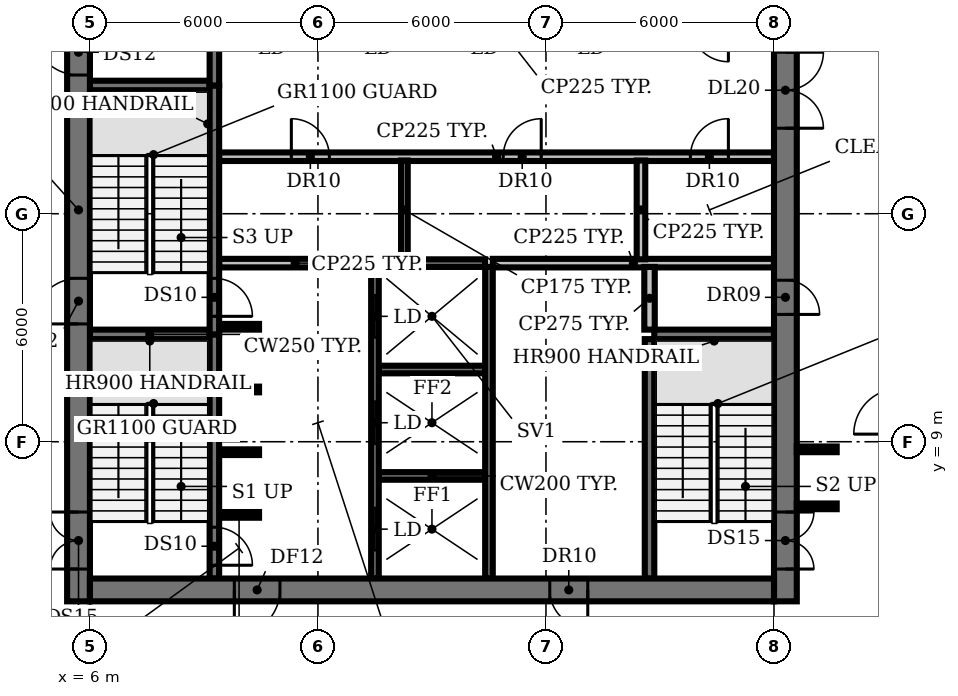
"""IFC4 building model, lengths in metres.
Left out: names, types, materials, properties, quantities, classifications, styles, units other than length and angle.
Written with IfcOpenShell. Run it as: python <this file> out.ifc"""

import sys

from ifc_helpers import new_model, si_unit, direction, frame, frame_2d, origin, place, context, subcontext, project, spatial, rectangle, extrude, element, fill, save


model = new_model("IFC4")
c1 = context("Model", 3, precision=1e-05, world=origin(), true_north=direction((0.0, 1.0)))
c2 = subcontext(c1, "Body", "Model", "MODEL_VIEW")
j1 = project(units=[si_unit("LENGTHUNIT", "METRE"), si_unit("PLANEANGLEUNIT", "RADIAN")], contexts=[c1])
p1 = place(None, origin())
s1 = spatial("IfcSite", under=j1, at=p1, CompositionType="ELEMENT")
p2 = place(p1, origin())
s2 = spatial("IfcBuilding", under=s1, at=p2, CompositionType="ELEMENT")
p3 = place(p2, frame((0.0, 0.0, 150.8)))
s3 = spatial("IfcBuildingStorey", under=s2, at=p3, CompositionType="ELEMENT", Elevation=150.8)
p4 = place(p3, frame((9.4, 7.075, 0.0), z_axis=(0.0, 0.0, 1.0), x_axis=(1.0, 0.0, 0.0)))
e1 = element("IfcWall", 1, at=p4, inside=s3, PredefinedType="SHEAR", context=c2, shape_type="SweptSolid", body=[
    extrude(rectangle(XDim=1.05, YDim=0.15, at=frame_2d((0.525, 0.0))), origin(), (0.0, 0.0, 1.0), 3.85),
])
p5 = place(p3, frame((13.6, 8.1, 0.0), z_axis=(0.0, 0.0, 1.0), x_axis=(1.0, 0.0, 0.0)))
e2 = element("IfcWall", 2, at=p5, inside=s3, PredefinedType="SHEAR", context=c2, shape_type="SweptSolid", body=[
    extrude(rectangle(XDim=2.8, YDim=0.2, at=frame_2d((1.4, 0.0))), origin(), (0.0, 0.0, 1.0), 3.85),
])
for number, where, z_axis, x_axis in (
    (3, (9.4, 8.725, 0.0), (0.0, 0.0, 1.0), (1.0, 0.0, 0.0)),
    (4, (9.4, 10.375, 0.0), (0.0, 0.0, 1.0), (1.0, 0.0, 0.0)),
):
    element("IfcWall", number, at=place(p3, frame(where, z_axis=z_axis, x_axis=x_axis)), inside=s3, PredefinedType="SHEAR", context=c2, shape_type="SweptSolid", body=[
        extrude(rectangle(XDim=1.05, YDim=0.15, at=frame_2d((0.525, 0.0))), origin(), (0.0, 0.0, 1.0), 3.85),
    ])
p6 = place(p3, frame((13.6, 10.9, 0.0), z_axis=(0.0, 0.0, 1.0), x_axis=(1.0, 0.0, 0.0)))
e5 = element("IfcWall", 5, at=p6, inside=s3, PredefinedType="SHEAR", context=c2, shape_type="SweptSolid", body=[
    extrude(rectangle(XDim=2.8, YDim=0.2, at=frame_2d((1.4, 0.0))), origin(), (0.0, 0.0, 1.0), 3.85),
])
for number, where, z_axis, x_axis in (
    (6, (6.0, 11.825, 0.0), (0.0, 0.0, 1.0), (1.0, 0.0, 0.0)),
    (7, (20.85, 11.825, 0.0), (0.0, 0.0, 1.0), (1.0, 0.0, 0.0)),
):
    element("IfcWall", number, at=place(p3, frame(where, z_axis=z_axis, x_axis=x_axis)), inside=s3, PredefinedType="SHEAR", context=c2, shape_type="SweptSolid", body=[
        extrude(rectangle(XDim=3.15, YDim=0.25, at=frame_2d((1.575, 0.0))), origin(), (0.0, 0.0, 1.0), 3.85),
    ])
p7 = place(p3, frame((9.4, 12.025, 0.0), z_axis=(0.0, 0.0, 1.0), x_axis=(1.0, 0.0, 0.0)))
e8 = element("IfcWall", 8, at=p7, inside=s3, PredefinedType="SHEAR", context=c2, shape_type="SweptSolid", body=[
    extrude(rectangle(XDim=1.05, YDim=0.15, at=frame_2d((0.525, 0.0))), origin(), (0.0, 0.0, 1.0), 3.85),
])
p8 = place(p3, frame((9.4, 13.7, 0.0), z_axis=(0.0, 0.0, 1.0), x_axis=(1.0, 0.0, 0.0)))
e9 = element("IfcWall", 9, at=p8, inside=s3, PredefinedType="PARTITIONING", context=c2, shape_type="SweptSolid", body=[
    extrude(rectangle(XDim=4.0, YDim=0.225, at=frame_2d((2.0, 0.0))), origin(), (0.0, 0.0, 1.0), 3.85),
])
p9 = place(p3, frame((13.6, 13.7, 0.0), z_axis=(0.0, 0.0, 1.0), x_axis=(1.0, 0.0, 0.0)))
e10 = element("IfcWall", 10, at=p9, inside=s3, PredefinedType="SHEAR", context=c2, shape_type="SweptSolid", body=[
    extrude(rectangle(XDim=2.8, YDim=0.2, at=frame_2d((1.4, 0.0))), origin(), (0.0, 0.0, 1.0), 3.85),
])
p10 = place(p3, frame((16.6, 13.7, 0.0), z_axis=(0.0, 0.0, 1.0), x_axis=(1.0, 0.0, 0.0)))
e11 = element("IfcWall", 11, at=p10, inside=s3, PredefinedType="PARTITIONING", context=c2, shape_type="SweptSolid", body=[
    extrude(rectangle(XDim=7.4, YDim=0.225, at=frame_2d((3.7, 0.0))), origin(), (0.0, 0.0, 1.0), 3.85),
])
p11 = place(p3, frame((9.4, 16.5, 0.0), z_axis=(0.0, 0.0, 1.0), x_axis=(1.0, 0.0, 0.0)))
e12 = element("IfcWall", 12, at=p11, inside=s3, PredefinedType="PARTITIONING", context=c2, shape_type="SweptSolid", body=[
    extrude(rectangle(XDim=14.6, YDim=0.225, at=frame_2d((7.3, 0.0))), origin(), (0.0, 0.0, 1.0), 3.85),
])
p12 = place(p11, frame((1.9, 0.0, 0.0)))
e13 = element("IfcOpeningElement", 13, at=p12, cuts=e12, PredefinedType="OPENING", context=c2, shape_type="SweptSolid", body=[
    extrude(rectangle(XDim=1.0, YDim=2.1, at=frame_2d((0.5, 1.05))), frame((0.0, 0.123, 0.0), z_axis=(0.0, -1.0, 0.0), x_axis=(1.0, 0.0, 0.0)), (0.0, 0.0, 1.0), 0.245),
])
p13 = place(p11, frame((7.475, 0.0, 0.0)))
e14 = element("IfcOpeningElement", 14, at=p13, cuts=e12, PredefinedType="OPENING", context=c2, shape_type="SweptSolid", body=[
    extrude(rectangle(XDim=1.0, YDim=2.1, at=frame_2d((0.5, 1.05))), frame((0.0, 0.123, 0.0), z_axis=(0.0, -1.0, 0.0), x_axis=(1.0, 0.0, 0.0)), (0.0, 0.0, 1.0), 0.245),
])
p14 = place(p11, frame((12.4, 0.0, 0.0)))
e15 = element("IfcOpeningElement", 15, at=p14, cuts=e12, PredefinedType="OPENING", context=c2, shape_type="SweptSolid", body=[
    extrude(rectangle(XDim=1.0, YDim=2.1, at=frame_2d((0.5, 1.05))), frame((0.0, 0.123, 0.0), z_axis=(0.0, -1.0, 0.0), x_axis=(1.0, 0.0, 0.0)), (0.0, 0.0, 1.0), 0.245),
])
p15 = place(p3, frame((6.0, 18.375, 0.0), z_axis=(0.0, 0.0, 1.0), x_axis=(1.0, 0.0, 0.0)))
e16 = element("IfcWall", 16, at=p15, inside=s3, PredefinedType="SHEAR", context=c2, shape_type="SweptSolid", body=[
    extrude(rectangle(XDim=3.15, YDim=0.25, at=frame_2d((1.575, 0.0))), origin(), (0.0, 0.0, 1.0), 3.85),
])
p16 = place(p3, frame((9.275, 11.825, 0.0), z_axis=(0.0, 0.0, 1.0), x_axis=(0.0, -1.0, 0.0)))
e17 = element("IfcWall", 17, at=p16, inside=s3, PredefinedType="SHEAR", context=c2, shape_type="SweptSolid", body=[
    extrude(rectangle(XDim=6.425, YDim=0.25, at=frame_2d((3.212, 0.0))), origin(), (0.0, 0.0, 1.0), 3.85),
])
p17 = place(p16, frame((5.075, 0.0, 0.0)))
e18 = element("IfcOpeningElement", 18, at=p17, cuts=e17, PredefinedType="OPENING", context=c2, shape_type="SweptSolid", body=[
    extrude(rectangle(XDim=1.0, YDim=2.1, at=frame_2d((0.5, 1.05))), frame((0.0, 0.135, 0.0), z_axis=(0.0, -1.0, 0.0), x_axis=(1.0, 0.0, 0.0)), (0.0, 0.0, 1.0), 0.27),
])
p18 = place(p3, frame((9.275, 18.375, 0.0), z_axis=(0.0, 0.0, 1.0), x_axis=(0.0, -1.0, 0.0)))
e19 = element("IfcWall", 19, at=p18, inside=s3, PredefinedType="SHEAR", context=c2, shape_type="SweptSolid", body=[
    extrude(rectangle(XDim=6.55, YDim=0.25, at=frame_2d((3.275, 0.0))), origin(), (0.0, 0.0, 1.0), 3.85),
])
p19 = place(p18, frame((5.075, 0.0, 0.0)))
e20 = element("IfcOpeningElement", 20, at=p19, cuts=e19, PredefinedType="OPENING", context=c2, shape_type="SweptSolid", body=[
    extrude(rectangle(XDim=1.0, YDim=2.1, at=frame_2d((0.5, 1.05))), frame((0.0, 0.135, 0.0), z_axis=(0.0, -1.0, 0.0), x_axis=(1.0, 0.0, 0.0)), (0.0, 0.0, 1.0), 0.27),
])
p20 = place(p3, frame((9.275, 18.375, 0.0), z_axis=(0.0, 0.0, 1.0), x_axis=(0.0, 1.0, 0.0)))
e21 = element("IfcWall", 21, at=p20, inside=s3, PredefinedType="SHEAR", context=c2, shape_type="SweptSolid", body=[
    extrude(rectangle(XDim=6.425, YDim=0.25, at=frame_2d((3.212, 0.0))), origin(), (0.0, 0.0, 1.0), 3.85),
])
p21 = place(p3, frame((13.5, 5.4, 0.0), z_axis=(0.0, 0.0, 1.0), x_axis=(0.0, 1.0, 0.0)))
e22 = element("IfcWall", 22, at=p21, inside=s3, PredefinedType="SHEAR", context=c2, shape_type="SweptSolid", body=[
    extrude(rectangle(XDim=8.2, YDim=0.2, at=frame_2d((4.1, 0.0))), origin(), (0.0, 0.0, 1.0), 3.85),
])
p22 = place(p21, frame((0.75, 0.0, 0.0)))
e23 = element("IfcOpeningElement", 23, at=p22, cuts=e22, PredefinedType="OPENING", context=c2, shape_type="SweptSolid", body=[
    extrude(rectangle(XDim=1.1, YDim=2.1, at=frame_2d((0.55, 1.05))), frame((0.0, 0.11, 0.0), z_axis=(0.0, -1.0, 0.0), x_axis=(1.0, 0.0, 0.0)), (0.0, 0.0, 1.0), 0.22),
])
p23 = place(p21, frame((3.55, 0.0, 0.0)))
e24 = element("IfcOpeningElement", 24, at=p23, cuts=e22, PredefinedType="OPENING", context=c2, shape_type="SweptSolid", body=[
    extrude(rectangle(XDim=1.1, YDim=2.1, at=frame_2d((0.55, 1.05))), frame((0.0, 0.11, 0.0), z_axis=(0.0, -1.0, 0.0), x_axis=(1.0, 0.0, 0.0)), (0.0, 0.0, 1.0), 0.22),
])
p24 = place(p21, frame((6.35, 0.0, 0.0)))
e25 = element("IfcOpeningElement", 25, at=p24, cuts=e22, PredefinedType="OPENING", context=c2, shape_type="SweptSolid", body=[
    extrude(rectangle(XDim=1.1, YDim=2.1, at=frame_2d((0.55, 1.05))), frame((0.0, 0.11, 0.0), z_axis=(0.0, -1.0, 0.0), x_axis=(1.0, 0.0, 0.0)), (0.0, 0.0, 1.0), 0.22),
])
p25 = place(p3, frame((14.275, 13.8, 0.0), z_axis=(0.0, 0.0, 1.0), x_axis=(0.0, 1.0, 0.0)))
e26 = element("IfcWall", 26, at=p25, inside=s3, PredefinedType="PARTITIONING", context=c2, shape_type="SweptSolid", body=[
    extrude(rectangle(XDim=2.6, YDim=0.175, at=frame_2d((1.3, 0.0))), origin(), (0.0, 0.0, 1.0), 3.85),
])
p26 = place(p3, frame((16.5, 5.4, 0.0), z_axis=(0.0, 0.0, 1.0), x_axis=(0.0, 1.0, 0.0)))
e27 = element("IfcWall", 27, at=p26, inside=s3, PredefinedType="SHEAR", context=c2, shape_type="SweptSolid", body=[
    extrude(rectangle(XDim=8.2, YDim=0.2, at=frame_2d((4.1, 0.0))), origin(), (0.0, 0.0, 1.0), 3.85),
])
p27 = place(p3, frame((20.5, 13.8, 0.0), z_axis=(0.0, 0.0, 1.0), x_axis=(0.0, 1.0, 0.0)))
e28 = element("IfcWall", 28, at=p27, inside=s3, PredefinedType="PARTITIONING", context=c2, shape_type="SweptSolid", body=[
    extrude(rectangle(XDim=2.6, YDim=0.225, at=frame_2d((1.3, 0.0))), origin(), (0.0, 0.0, 1.0), 3.85),
])
p28 = place(p3, frame((20.725, 5.4, 0.0), z_axis=(0.0, 0.0, 1.0), x_axis=(0.0, 1.0, 0.0)))
e29 = element("IfcWall", 29, at=p28, inside=s3, PredefinedType="SHEAR", context=c2, shape_type="SweptSolid", body=[
    extrude(rectangle(XDim=6.3, YDim=0.25, at=frame_2d((3.15, 0.0))), origin(), (0.0, 0.0, 1.0), 3.85),
])
p29 = place(p3, frame((20.725, 11.95, 0.0), z_axis=(0.0, 0.0, 1.0), x_axis=(0.0, 1.0, 0.0)))
e30 = element("IfcWall", 30, at=p29, inside=s3, PredefinedType="PARTITIONING", context=c2, shape_type="SweptSolid", body=[
    extrude(rectangle(XDim=1.65, YDim=0.275, at=frame_2d((0.825, 0.0))), origin(), (0.0, 0.0, 1.0), 3.85),
])
p30 = place(p3, frame((5.7, 4.8, 0.0), z_axis=(0.0, 0.0, 1.0), x_axis=(0.0, 1.0, 0.0)))
e31 = element("IfcWall", 31, at=p30, inside=s3, PredefinedType="SHEAR", context=c2, shape_type="SweptSolid", body=[
    extrude(rectangle(XDim=20.6, YDim=0.6, at=frame_2d((10.3, 0.0))), origin(), (0.0, 0.0, 1.0), 3.85),
])
p31 = place(p30, frame((0.85, 0.0, 0.0)))
e32 = element("IfcOpeningElement", 32, at=p31, cuts=e31, PredefinedType="OPENING", context=c2, shape_type="SweptSolid", body=[
    extrude(rectangle(XDim=1.5, YDim=2.1, at=frame_2d((0.75, 1.05))), frame((0.0, 0.31, 0.0), z_axis=(0.0, -1.0, 0.0), x_axis=(1.0, 0.0, 0.0)), (0.0, 0.0, 1.0), 0.62),
])
p32 = place(p30, frame((7.3, 0.0, 0.0)))
e33 = element("IfcOpeningElement", 33, at=p32, cuts=e31, PredefinedType="OPENING", context=c2, shape_type="SweptSolid", body=[
    extrude(rectangle(XDim=1.2, YDim=2.1, at=frame_2d((0.6, 1.05))), frame((0.0, 0.31, 0.0), z_axis=(0.0, -1.0, 0.0), x_axis=(1.0, 0.0, 0.0)), (0.0, 0.0, 1.0), 0.62),
])
p33 = place(p30, frame((13.85, 0.0, 0.0)))
e34 = element("IfcOpeningElement", 34, at=p33, cuts=e31, PredefinedType="OPENING", context=c2, shape_type="SweptSolid", body=[
    extrude(rectangle(XDim=1.2, YDim=2.1, at=frame_2d((0.6, 1.05))), frame((0.0, 0.31, 0.0), z_axis=(0.0, -1.0, 0.0), x_axis=(1.0, 0.0, 0.0)), (0.0, 0.0, 1.0), 0.62),
])
p34 = place(p3, frame((24.3, 25.555, 0.0), z_axis=(0.0, 0.0, 1.0), x_axis=(0.0, -1.0, 0.0)))
e35 = element("IfcWall", 35, at=p34, inside=s3, PredefinedType="SHEAR", context=c2, shape_type="SweptSolid", body=[
    extrude(rectangle(XDim=20.755, YDim=0.6, at=frame_2d((10.377, 0.0))), origin(), (0.0, 0.0, 1.0), 3.85),
])
p35 = place(p34, frame((18.405, 0.0, 0.0)))
e36 = element("IfcOpeningElement", 36, at=p35, cuts=e35, PredefinedType="OPENING", context=c2, shape_type="SweptSolid", body=[
    extrude(rectangle(XDim=1.5, YDim=2.1, at=frame_2d((0.75, 1.05))), frame((0.0, 0.31, 0.0), z_axis=(0.0, -1.0, 0.0), x_axis=(1.0, 0.0, 0.0)), (0.0, 0.0, 1.0), 0.62),
])
p36 = place(p34, frame((12.305, 0.0, 0.0)))
e37 = element("IfcOpeningElement", 37, at=p36, cuts=e35, PredefinedType="OPENING", context=c2, shape_type="SweptSolid", body=[
    extrude(rectangle(XDim=0.9, YDim=2.1, at=frame_2d((0.45, 1.05))), frame((0.0, 0.31, 0.0), z_axis=(0.0, -1.0, 0.0), x_axis=(1.0, 0.0, 0.0)), (0.0, 0.0, 1.0), 0.62),
])
p37 = place(p34, frame((6.305, 0.0, 0.0)))
e38 = element("IfcOpeningElement", 38, at=p37, cuts=e35, PredefinedType="OPENING", context=c2, shape_type="SweptSolid", body=[
    extrude(rectangle(XDim=2.0, YDim=2.1, at=frame_2d((1.0, 1.05))), frame((0.0, 0.31, 0.0), z_axis=(0.0, -1.0, 0.0), x_axis=(1.0, 0.0, 0.0)), (0.0, 0.0, 1.0), 0.62),
])
p38 = place(p3, frame((24.0, 5.1, 0.0), z_axis=(0.0, 0.0, 1.0), x_axis=(-1.0, 0.0, 0.0)))
e39 = element("IfcWall", 39, at=p38, inside=s3, PredefinedType="SHEAR", context=c2, shape_type="SweptSolid", body=[
    extrude(rectangle(XDim=18.0, YDim=0.6, at=frame_2d((9.0, 0.0))), origin(), (0.0, 0.0, 1.0), 3.85),
])
p39 = place(p38, frame((13.0, 0.0, 0.0)))
e40 = element("IfcOpeningElement", 40, at=p39, cuts=e39, PredefinedType="OPENING", context=c2, shape_type="SweptSolid", body=[
    extrude(rectangle(XDim=1.2, YDim=2.1, at=frame_2d((0.6, 1.05))), frame((0.0, 0.31, 0.0), z_axis=(0.0, -1.0, 0.0), x_axis=(1.0, 0.0, 0.0)), (0.0, 0.0, 1.0), 0.62),
])
p40 = place(p38, frame((4.9, 0.0, 0.0)))
e41 = element("IfcOpeningElement", 41, at=p40, cuts=e39, PredefinedType="OPENING", context=c2, shape_type="SweptSolid", body=[
    extrude(rectangle(XDim=1.0, YDim=2.1, at=frame_2d((0.5, 1.05))), frame((0.0, 0.31, 0.0), z_axis=(0.0, -1.0, 0.0), x_axis=(1.0, 0.0, 0.0)), (0.0, 0.0, 1.0), 0.62),
])
for number, where, z_axis, x_axis in (
    (42, (24.6, 7.3, 0.0), (0.0, 0.0, 1.0), (1.0, 0.0, 0.0)),
    (43, (24.6, 8.8, 0.0), (0.0, 0.0, 1.0), (1.0, 0.0, 0.0)),
):
    element("IfcWall", number, at=place(p3, frame(where, z_axis=z_axis, x_axis=x_axis)), inside=s3, PredefinedType="PARTITIONING", context=c2, shape_type="SweptSolid", body=[
        extrude(rectangle(XDim=1.05, YDim=0.15, at=frame_2d((0.525, 0.0))), origin(), (0.0, 0.0, 1.0), 2.88),
    ])
p41 = place(p12, origin())
e44 = element("IfcDoor", 44, at=p41, inside=s3, OperationType="SINGLE_SWING_LEFT", PredefinedType="DOOR", context=c2, shape_type="SweptSolid", body=[
    extrude(rectangle(XDim=1.0, YDim=2.1, at=frame_2d((0.5, 1.05))), frame((0.0, 0.025, 0.0), z_axis=(0.0, -1.0, 0.0), x_axis=(1.0, 0.0, 0.0)), (0.0, 0.0, 1.0), 0.05),
])
fill(e13, e44)
p42 = place(p13, origin())
e45 = element("IfcDoor", 45, at=p42, inside=s3, OperationType="SINGLE_SWING_RIGHT", PredefinedType="DOOR", context=c2, shape_type="SweptSolid", body=[
    extrude(rectangle(XDim=1.0, YDim=2.1, at=frame_2d((0.5, 1.05))), frame((0.0, 0.025, 0.0), z_axis=(0.0, -1.0, 0.0), x_axis=(1.0, 0.0, 0.0)), (0.0, 0.0, 1.0), 0.05),
])
fill(e14, e45)
p43 = place(p14, origin())
e46 = element("IfcDoor", 46, at=p43, inside=s3, OperationType="SINGLE_SWING_RIGHT", PredefinedType="DOOR", context=c2, shape_type="SweptSolid", body=[
    extrude(rectangle(XDim=1.0, YDim=2.1, at=frame_2d((0.5, 1.05))), frame((0.0, 0.025, 0.0), z_axis=(0.0, -1.0, 0.0), x_axis=(1.0, 0.0, 0.0)), (0.0, 0.0, 1.0), 0.05),
])
fill(e15, e46)
p44 = place(p17, origin())
e47 = element("IfcDoor", 47, at=p44, inside=s3, OperationType="SINGLE_SWING_RIGHT", PredefinedType="DOOR", context=c2, shape_type="SweptSolid", body=[
    extrude(rectangle(XDim=1.0, YDim=2.1, at=frame_2d((0.5, 1.05))), frame((0.0, 0.025, 0.0), z_axis=(0.0, -1.0, 0.0), x_axis=(1.0, 0.0, 0.0)), (0.0, 0.0, 1.0), 0.05),
])
fill(e18, e47)
p45 = place(p19, origin())
e48 = element("IfcDoor", 48, at=p45, inside=s3, OperationType="SINGLE_SWING_RIGHT", PredefinedType="DOOR", context=c2, shape_type="SweptSolid", body=[
    extrude(rectangle(XDim=1.0, YDim=2.1, at=frame_2d((0.5, 1.05))), frame((0.0, 0.025, 0.0), z_axis=(0.0, -1.0, 0.0), x_axis=(1.0, 0.0, 0.0)), (0.0, 0.0, 1.0), 0.05),
])
fill(e20, e48)
p46 = place(p22, origin())
e49 = element("IfcDoor", 49, at=p46, inside=s3, OperationType="DOUBLE_DOOR_SLIDING", PredefinedType="DOOR", context=c2, shape_type="SweptSolid", body=[
    extrude(rectangle(XDim=1.1, YDim=2.1, at=frame_2d((0.55, 1.05))), frame((0.0, 0.025, 0.0), z_axis=(0.0, -1.0, 0.0), x_axis=(1.0, 0.0, 0.0)), (0.0, 0.0, 1.0), 0.05),
])
fill(e23, e49)
p47 = place(p23, origin())
e50 = element("IfcDoor", 50, at=p47, inside=s3, OperationType="DOUBLE_DOOR_SLIDING", PredefinedType="DOOR", context=c2, shape_type="SweptSolid", body=[
    extrude(rectangle(XDim=1.1, YDim=2.1, at=frame_2d((0.55, 1.05))), frame((0.0, 0.025, 0.0), z_axis=(0.0, -1.0, 0.0), x_axis=(1.0, 0.0, 0.0)), (0.0, 0.0, 1.0), 0.05),
])
fill(e24, e50)
p48 = place(p24, origin())
e51 = element("IfcDoor", 51, at=p48, inside=s3, OperationType="DOUBLE_DOOR_SLIDING", PredefinedType="DOOR", context=c2, shape_type="SweptSolid", body=[
    extrude(rectangle(XDim=1.1, YDim=2.1, at=frame_2d((0.55, 1.05))), frame((0.0, 0.025, 0.0), z_axis=(0.0, -1.0, 0.0), x_axis=(1.0, 0.0, 0.0)), (0.0, 0.0, 1.0), 0.05),
])
fill(e25, e51)
p49 = place(p31, origin())
e52 = element("IfcDoor", 52, at=p49, inside=s3, OperationType="DOUBLE_DOOR_SINGLE_SWING", PredefinedType="DOOR", context=c2, shape_type="SweptSolid", body=[
    extrude(rectangle(XDim=1.5, YDim=2.1, at=frame_2d((0.75, 1.05))), frame((0.0, 0.025, 0.0), z_axis=(0.0, -1.0, 0.0), x_axis=(1.0, 0.0, 0.0)), (0.0, 0.0, 1.0), 0.05),
])
fill(e32, e52)
p50 = place(p32, origin())
e53 = element("IfcDoor", 53, at=p50, inside=s3, OperationType="SINGLE_SWING_LEFT", PredefinedType="DOOR", context=c2, shape_type="SweptSolid", body=[
    extrude(rectangle(XDim=1.2, YDim=2.1, at=frame_2d((0.6, 1.05))), frame((0.0, 0.025, 0.0), z_axis=(0.0, -1.0, 0.0), x_axis=(1.0, 0.0, 0.0)), (0.0, 0.0, 1.0), 0.05),
])
fill(e33, e53)
p51 = place(p33, origin())
e54 = element("IfcDoor", 54, at=p51, inside=s3, OperationType="SINGLE_SWING_RIGHT", PredefinedType="DOOR", context=c2, shape_type="SweptSolid", body=[
    extrude(rectangle(XDim=1.2, YDim=2.1, at=frame_2d((0.6, 1.05))), frame((0.0, 0.025, 0.0), z_axis=(0.0, -1.0, 0.0), x_axis=(1.0, 0.0, 0.0)), (0.0, 0.0, 1.0), 0.05),
])
fill(e34, e54)
p52 = place(p35, origin())
e55 = element("IfcDoor", 55, at=p52, inside=s3, OperationType="DOUBLE_DOOR_SINGLE_SWING", PredefinedType="DOOR", context=c2, shape_type="SweptSolid", body=[
    extrude(rectangle(XDim=1.5, YDim=2.1, at=frame_2d((0.75, 1.05))), frame((0.0, 0.025, 0.0), z_axis=(0.0, -1.0, 0.0), x_axis=(1.0, 0.0, 0.0)), (0.0, 0.0, 1.0), 0.05),
])
fill(e36, e55)
p53 = place(p36, origin())
e56 = element("IfcDoor", 56, at=p53, inside=s3, OperationType="SINGLE_SWING_RIGHT", PredefinedType="DOOR", context=c2, shape_type="SweptSolid", body=[
    extrude(rectangle(XDim=0.9, YDim=2.1, at=frame_2d((0.45, 1.05))), frame((0.0, -0.24, 0.0), z_axis=(0.0, -1.0, 0.0), x_axis=(1.0, 0.0, 0.0)), (0.0, 0.0, 1.0), 0.05),
])
fill(e37, e56)
p54 = place(p37, origin())
e57 = element("IfcDoor", 57, at=p54, inside=s3, OperationType="DOUBLE_DOOR_SINGLE_SWING", PredefinedType="DOOR", context=c2, shape_type="SweptSolid", body=[
    extrude(rectangle(XDim=2.0, YDim=2.1, at=frame_2d((1.0, 1.05))), frame((0.0, 0.025, 0.0), z_axis=(0.0, -1.0, 0.0), x_axis=(1.0, 0.0, 0.0)), (0.0, 0.0, 1.0), 0.05),
])
fill(e38, e57)
p55 = place(p39, origin())
e58 = element("IfcDoor", 58, at=p55, inside=s3, OperationType="SINGLE_SWING_RIGHT", PredefinedType="DOOR", context=c2, shape_type="SweptSolid", body=[
    extrude(rectangle(XDim=1.2, YDim=2.1, at=frame_2d((0.6, 1.05))), frame((0.0, 0.025, 0.0), z_axis=(0.0, -1.0, 0.0), x_axis=(1.0, 0.0, 0.0)), (0.0, 0.0, 1.0), 0.05),
])
fill(e40, e58)
p56 = place(p40, origin())
e59 = element("IfcDoor", 59, at=p56, inside=s3, OperationType="SINGLE_SWING_LEFT", PredefinedType="DOOR", context=c2, shape_type="SweptSolid", body=[
    extrude(rectangle(XDim=1.0, YDim=2.1, at=frame_2d((0.5, 1.05))), frame((0.0, -0.24, 0.0), z_axis=(0.0, -1.0, 0.0), x_axis=(1.0, 0.0, 0.0)), (0.0, 0.0, 1.0), 0.05),
])
fill(e41, e59)
save(model, sys.argv[1])
